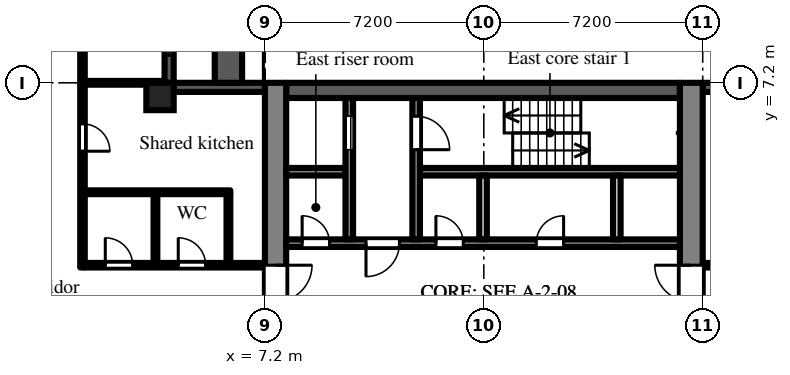
"""IFC4 building model, lengths in metres.
Left out: names, types, materials, properties, quantities, classifications, styles, units other than length and angle.
Written with IfcOpenShell. Run it as: python <this file> out.ifc"""

import sys

from ifc_helpers import new_model, si_unit, direction, frame, frame_2d, origin, origin_2d, place, context, subcontext, project, spatial, rectangle, extrude, element, fill, save


model = new_model("IFC4")
c1 = context("Model", 3, precision=1e-05, world=origin(), true_north=direction((0.0, 1.0)))
c2 = subcontext(c1, "Body", "Model", "MODEL_VIEW")
j1 = project(units=[si_unit("LENGTHUNIT", "METRE"), si_unit("PLANEANGLEUNIT", "RADIAN")], contexts=[c1])
p1 = place(None, origin())
s1 = spatial("IfcSite", under=j1, at=p1, CompositionType="ELEMENT")
p2 = place(p1, origin())
s2 = spatial("IfcBuilding", under=s1, at=p2, CompositionType="ELEMENT")
p3 = place(p2, frame((0.0, 0.0, 44.7)))
s3 = spatial("IfcBuildingStorey", under=s2, at=p3, CompositionType="ELEMENT", Elevation=44.7)
p4 = place(p3, frame((3.75, 6.75, 0.0), z_axis=(0.0, 0.0, 1.0), x_axis=(1.0, 0.0, 0.0)))
e1 = element("IfcColumn", 1, at=p4, inside=s3, PredefinedType="COLUMN", context=c2, shape_type="SweptSolid", body=[
    extrude(rectangle(XDim=0.9, YDim=0.9, at=origin_2d()), origin(), (0.0, 0.0, 1.0), 3.0),
])
p5 = place(p3, frame((24.3, 7.05, 0.0), z_axis=(0.0, 0.0, 1.0), x_axis=(-1.0, 0.0, 0.0)))
e2 = element("IfcWall", 2, at=p5, inside=s3, PredefinedType="SOLIDWALL", context=c2, shape_type="SweptSolid", body=[
    extrude(rectangle(XDim=2.7, YDim=0.3, at=frame_2d((1.35, 0.0))), origin(), (0.0, 0.0, 1.0), 2.1),
])
p6 = place(p5, frame((0.75, 0.0, 0.2)))
e3 = element("IfcOpeningElement", 3, at=p6, cuts=e2, PredefinedType="OPENING", context=c2, shape_type="SweptSolid", body=[
    extrude(rectangle(XDim=1.2, YDim=1.85, at=frame_2d((0.6, 0.925))), frame((0.0, 0.16, 0.0), z_axis=(0.0, -1.0, 0.0), x_axis=(1.0, 0.0, 0.0)), (0.0, 0.0, 1.0), 0.32),
])
p7 = place(p3, frame((7.2, 7.05, 0.0), z_axis=(0.0, 0.0, 1.0), x_axis=(-1.0, 0.0, 0.0)))
e4 = element("IfcWall", 4, at=p7, inside=s3, PredefinedType="SOLIDWALL", context=c2, shape_type="SweptSolid", body=[
    extrude(rectangle(XDim=3.0, YDim=0.3, at=frame_2d((1.5, 0.0))), origin(), (0.0, 0.0, 1.0), 2.1),
])
p8 = place(p3, frame((4.05, 7.2, 0.0), z_axis=(0.0, 0.0, 1.0), x_axis=(0.0, 1.0, 0.0)))
e5 = element("IfcWall", 5, at=p8, inside=s3, PredefinedType="SOLIDWALL", context=c2, shape_type="SweptSolid", body=[
    extrude(rectangle(XDim=7.2, YDim=0.3, at=frame_2d((3.6, 0.0))), origin(), (0.0, 0.0, 1.0), 2.1),
])
p9 = place(p8, frame((3.0, 0.0, 0.0)))
e6 = element("IfcOpeningElement", 6, at=p9, cuts=e5, PredefinedType="OPENING", context=c2, shape_type="SweptSolid", body=[
    extrude(rectangle(XDim=1.2, YDim=2.05, at=frame_2d((0.6, 1.025))), frame((0.0, 0.16, 0.0), z_axis=(0.0, -1.0, 0.0), x_axis=(1.0, 0.0, 0.0)), (0.0, 0.0, 1.0), 0.32),
])
p10 = place(p8, frame((0.9, 0.0, 0.2)))
e7 = element("IfcOpeningElement", 7, at=p10, cuts=e5, PredefinedType="OPENING", context=c2, shape_type="SweptSolid", body=[
    extrude(rectangle(XDim=1.8, YDim=1.85, at=frame_2d((0.9, 0.925))), frame((0.0, 0.16, 0.0), z_axis=(0.0, -1.0, 0.0), x_axis=(1.0, 0.0, 0.0)), (0.0, 0.0, 1.0), 0.32),
])
p11 = place(p8, frame((4.5, 0.0, 0.2)))
e8 = element("IfcOpeningElement", 8, at=p11, cuts=e5, PredefinedType="OPENING", context=c2, shape_type="SweptSolid", body=[
    extrude(rectangle(XDim=1.8, YDim=1.85, at=frame_2d((0.9, 0.925))), frame((0.0, 0.16, 0.0), z_axis=(0.0, -1.0, 0.0), x_axis=(1.0, 0.0, 0.0)), (0.0, 0.0, 1.0), 0.32),
])
p12 = place(p3, frame((6.0, 7.2, 0.0), z_axis=(0.0, 0.0, 1.0), x_axis=(0.0, 1.0, 0.0)))
e9 = element("IfcWall", 9, at=p12, inside=s3, PredefinedType="PARAPET", context=c2, shape_type="SweptSolid", body=[
    extrude(rectangle(XDim=7.2, YDim=0.9, at=frame_2d((3.6, 0.0))), origin(), (0.0, 0.0, 1.0), 0.8),
])
p13 = place(p3, frame((7.55, -7.2, 0.0), z_axis=(0.0, 0.0, 1.0), x_axis=(0.0, 1.0, 0.0)))
e10 = element("IfcWall", 10, at=p13, inside=s3, PredefinedType="SHEAR", context=c2, shape_type="SweptSolid", body=[
    extrude(rectangle(XDim=14.4, YDim=0.7, at=frame_2d((7.2, 0.0))), origin(), (0.0, 0.0, 1.0), 2.575),
])
p14 = place(p13, frame((6.0, 0.0, 0.0)))
e11 = element("IfcOpeningElement", 11, at=p14, cuts=e10, PredefinedType="OPENING", context=c2, shape_type="SweptSolid", body=[
    extrude(rectangle(XDim=2.4, YDim=2.2, at=frame_2d((1.2, 1.1))), frame((0.0, 0.36, 0.0), z_axis=(0.0, -1.0, 0.0), x_axis=(1.0, 0.0, 0.0)), (0.0, 0.0, 1.0), 0.72),
])
p15 = place(p3, frame((21.225, -7.2, 0.0), z_axis=(0.0, 0.0, 1.0), x_axis=(0.0, 1.0, 0.0)))
e12 = element("IfcWall", 12, at=p15, inside=s3, PredefinedType="SHEAR", context=c2, shape_type="SweptSolid", body=[
    extrude(rectangle(XDim=14.4, YDim=0.75, at=frame_2d((7.2, 0.0))), origin(), (0.0, 0.0, 1.0), 2.575),
])
p16 = place(p15, frame((6.0, 0.0, 0.0)))
e13 = element("IfcOpeningElement", 13, at=p16, cuts=e12, PredefinedType="OPENING", context=c2, shape_type="SweptSolid", body=[
    extrude(rectangle(XDim=2.4, YDim=2.2, at=frame_2d((1.2, 1.1))), frame((0.0, 0.385, 0.0), z_axis=(0.0, -1.0, 0.0), x_axis=(1.0, 0.0, 0.0)), (0.0, 0.0, 1.0), 0.77),
])
p17 = place(p3, frame((7.9, 6.95, 0.0), z_axis=(0.0, 0.0, 1.0), x_axis=(1.0, 0.0, 0.0)))
e14 = element("IfcWall", 14, at=p17, inside=s3, PredefinedType="SHEAR", context=c2, shape_type="SweptSolid", body=[
    extrude(rectangle(XDim=12.95, YDim=0.5, at=frame_2d((6.475, 0.0))), origin(), (0.0, 0.0, 1.0), 2.575),
])
p18 = place(p3, frame((7.9, 1.925, 0.0), z_axis=(0.0, 0.0, 1.0), x_axis=(1.0, 0.0, 0.0)))
e15 = element("IfcWall", 15, at=p18, inside=s3, PredefinedType="SHEAR", context=c2, shape_type="SweptSolid", body=[
    extrude(rectangle(XDim=12.95, YDim=0.25, at=frame_2d((6.475, 0.0))), origin(), (0.0, 0.0, 1.0), 2.575),
])
p19 = place(p18, frame((0.525, 0.0, 0.0)))
e16 = element("IfcOpeningElement", 16, at=p19, cuts=e15, PredefinedType="OPENING", context=c2, shape_type="SweptSolid", body=[
    extrude(rectangle(XDim=0.9, YDim=2.1, at=frame_2d((0.45, 1.05))), frame((0.0, 0.135, 0.0), z_axis=(0.0, -1.0, 0.0), x_axis=(1.0, 0.0, 0.0)), (0.0, 0.0, 1.0), 0.27),
])
p20 = place(p18, frame((2.625, 0.0, 0.0)))
e17 = element("IfcOpeningElement", 17, at=p20, cuts=e15, PredefinedType="OPENING", context=c2, shape_type="SweptSolid", body=[
    extrude(rectangle(XDim=1.1, YDim=2.1, at=frame_2d((0.55, 1.05))), frame((0.0, 0.135, 0.0), z_axis=(0.0, -1.0, 0.0), x_axis=(1.0, 0.0, 0.0)), (0.0, 0.0, 1.0), 0.27),
])
p21 = place(p18, frame((4.925, 0.0, 0.0)))
e18 = element("IfcOpeningElement", 18, at=p21, cuts=e15, PredefinedType="OPENING", context=c2, shape_type="SweptSolid", body=[
    extrude(rectangle(XDim=0.9, YDim=2.1, at=frame_2d((0.45, 1.05))), frame((0.0, 0.135, 0.0), z_axis=(0.0, -1.0, 0.0), x_axis=(1.0, 0.0, 0.0)), (0.0, 0.0, 1.0), 0.27),
])
p22 = place(p18, frame((8.225, 0.0, 0.0)))
e19 = element("IfcOpeningElement", 19, at=p22, cuts=e15, PredefinedType="OPENING", context=c2, shape_type="SweptSolid", body=[
    extrude(rectangle(XDim=0.9, YDim=2.1, at=frame_2d((0.45, 1.05))), frame((0.0, 0.135, 0.0), z_axis=(0.0, -1.0, 0.0), x_axis=(1.0, 0.0, 0.0)), (0.0, 0.0, 1.0), 0.27),
])
p23 = place(p3, frame((7.9, 4.275, 0.0), z_axis=(0.0, 0.0, 1.0), x_axis=(1.0, 0.0, 0.0)))
e20 = element("IfcWall", 20, at=p23, inside=s3, PredefinedType="SHEAR", context=c2, shape_type="SweptSolid", body=[
    extrude(rectangle(XDim=1.95, YDim=0.25, at=frame_2d((0.975, 0.0))), origin(), (0.0, 0.0, 1.0), 2.575),
])
p24 = place(p3, frame((12.3, 4.275, 0.0), z_axis=(0.0, 0.0, 1.0), x_axis=(1.0, 0.0, 0.0)))
e21 = element("IfcWall", 21, at=p24, inside=s3, PredefinedType="SHEAR", context=c2, shape_type="SweptSolid", body=[
    extrude(rectangle(XDim=8.55, YDim=0.25, at=frame_2d((4.275, 0.0))), origin(), (0.0, 0.0, 1.0), 2.575),
])
p25 = place(p3, frame((9.975, 2.05, 0.0), z_axis=(0.0, 0.0, 1.0), x_axis=(0.0, 1.0, 0.0)))
e22 = element("IfcWall", 22, at=p25, inside=s3, PredefinedType="SHEAR", context=c2, shape_type="SweptSolid", body=[
    extrude(rectangle(XDim=4.65, YDim=0.25, at=frame_2d((2.325, 0.0))), origin(), (0.0, 0.0, 1.0), 2.575),
])
p26 = place(p25, frame((2.95, 0.0, 0.0)))
e23 = element("IfcOpeningElement", 23, at=p26, cuts=e22, PredefinedType="OPENING", context=c2, shape_type="SweptSolid", body=[
    extrude(rectangle(XDim=1.1, YDim=2.1, at=frame_2d((0.55, 1.05))), frame((0.0, 0.135, 0.0), z_axis=(0.0, -1.0, 0.0), x_axis=(1.0, 0.0, 0.0)), (0.0, 0.0, 1.0), 0.27),
])
p27 = place(p3, frame((12.175, 2.05, 0.0), z_axis=(0.0, 0.0, 1.0), x_axis=(0.0, 1.0, 0.0)))
e24 = element("IfcWall", 24, at=p27, inside=s3, PredefinedType="SHEAR", context=c2, shape_type="SweptSolid", body=[
    extrude(rectangle(XDim=4.65, YDim=0.25, at=frame_2d((2.325, 0.0))), origin(), (0.0, 0.0, 1.0), 2.575),
])
p28 = place(p27, frame((2.95, 0.0, 0.0)))
e25 = element("IfcOpeningElement", 25, at=p28, cuts=e24, PredefinedType="OPENING", context=c2, shape_type="SweptSolid", body=[
    extrude(rectangle(XDim=1.1, YDim=2.1, at=frame_2d((0.55, 1.05))), frame((0.0, 0.135, 0.0), z_axis=(0.0, -1.0, 0.0), x_axis=(1.0, 0.0, 0.0)), (0.0, 0.0, 1.0), 0.27),
])
for number, where, z_axis, x_axis in (
    (26, (14.375, 2.05, 0.0), (0.0, 0.0, 1.0), (0.0, 1.0, 0.0)),
    (27, (18.775, 2.05, 0.0), (0.0, 0.0, 1.0), (0.0, 1.0, 0.0)),
):
    element("IfcWall", number, at=place(p3, frame(where, z_axis=z_axis, x_axis=x_axis)), inside=s3, PredefinedType="PARTITIONING", context=c2, shape_type="SweptSolid", body=[
        extrude(rectangle(XDim=2.1, YDim=0.25, at=frame_2d((1.05, 0.0))), origin(), (0.0, 0.0, 1.0), 2.575),
    ])
p29 = place(p3, frame((1.2, 1.125, 0.0), z_axis=(0.0, 0.0, 1.0), x_axis=(0.0, 1.0, 0.0)))
e28 = element("IfcWall", 28, at=p29, inside=s3, PredefinedType="PARTITIONING", context=c2, shape_type="SweptSolid", body=[
    extrude(rectangle(XDim=35.375, YDim=0.15, at=frame_2d((17.688, 0.0))), origin(), (0.0, 0.0, 1.0), 2.575),
])
p30 = place(p29, frame((3.825, 0.0, 0.0)))
e29 = element("IfcOpeningElement", 29, at=p30, cuts=e28, PredefinedType="OPENING", context=c2, shape_type="SweptSolid", body=[
    extrude(rectangle(XDim=0.9, YDim=2.1, at=frame_2d((0.45, 1.05))), frame((0.0, 0.085, 0.0), z_axis=(0.0, -1.0, 0.0), x_axis=(1.0, 0.0, 0.0)), (0.0, 0.0, 1.0), 0.17),
])
p31 = place(p29, frame((7.425, 0.0, 0.0)))
e30 = element("IfcOpeningElement", 30, at=p31, cuts=e28, PredefinedType="OPENING", context=c2, shape_type="SweptSolid", body=[
    extrude(rectangle(XDim=0.9, YDim=2.1, at=frame_2d((0.45, 1.05))), frame((0.0, 0.085, 0.0), z_axis=(0.0, -1.0, 0.0), x_axis=(1.0, 0.0, 0.0)), (0.0, 0.0, 1.0), 0.17),
])
p32 = place(p29, frame((13.725, 0.0, 0.0)))
e31 = element("IfcOpeningElement", 31, at=p32, cuts=e28, PredefinedType="OPENING", context=c2, shape_type="SweptSolid", body=[
    extrude(rectangle(XDim=0.9, YDim=2.1, at=frame_2d((0.45, 1.05))), frame((0.0, 0.085, 0.0), z_axis=(0.0, -1.0, 0.0), x_axis=(1.0, 0.0, 0.0)), (0.0, 0.0, 1.0), 0.17),
])
p33 = place(p29, frame((15.525, 0.0, 0.0)))
e32 = element("IfcOpeningElement", 32, at=p33, cuts=e28, PredefinedType="OPENING", context=c2, shape_type="SweptSolid", body=[
    extrude(rectangle(XDim=0.9, YDim=2.1, at=frame_2d((0.45, 1.05))), frame((0.0, 0.085, 0.0), z_axis=(0.0, -1.0, 0.0), x_axis=(1.0, 0.0, 0.0)), (0.0, 0.0, 1.0), 0.17),
])
p34 = place(p29, frame((32.825, 0.0, 0.0)))
e33 = element("IfcOpeningElement", 33, at=p34, cuts=e28, PredefinedType="OPENING", context=c2, shape_type="SweptSolid", body=[
    extrude(rectangle(XDim=1.0, YDim=2.1, at=frame_2d((0.5, 1.05))), frame((0.0, 0.085, 0.0), z_axis=(0.0, -1.0, 0.0), x_axis=(1.0, 0.0, 0.0)), (0.0, 0.0, 1.0), 0.17),
])
p35 = place(p3, frame((1.275, 1.2, 0.0), z_axis=(0.0, 0.0, 1.0), x_axis=(1.0, 0.0, 0.0)))
e34 = element("IfcWall", 34, at=p35, inside=s3, PredefinedType="PARTITIONING", context=c2, shape_type="SweptSolid", body=[
    extrude(rectangle(XDim=5.925, YDim=0.15, at=frame_2d((2.962, 0.0))), origin(), (0.0, 0.0, 1.0), 2.575),
])
p36 = place(p35, frame((0.675, 0.0, 0.0)))
e35 = element("IfcOpeningElement", 35, at=p36, cuts=e34, PredefinedType="OPENING", context=c2, shape_type="SweptSolid", body=[
    extrude(rectangle(XDim=0.9, YDim=2.1, at=frame_2d((0.45, 1.05))), frame((0.0, 0.085, 0.0), z_axis=(0.0, -1.0, 0.0), x_axis=(1.0, 0.0, 0.0)), (0.0, 0.0, 1.0), 0.17),
])
p37 = place(p35, frame((3.075, 0.0, 0.0)))
e36 = element("IfcOpeningElement", 36, at=p37, cuts=e34, PredefinedType="OPENING", context=c2, shape_type="SweptSolid", body=[
    extrude(rectangle(XDim=0.9, YDim=2.1, at=frame_2d((0.45, 1.05))), frame((0.0, 0.085, 0.0), z_axis=(0.0, -1.0, 0.0), x_axis=(1.0, 0.0, 0.0)), (0.0, 0.0, 1.0), 0.17),
])
p38 = place(p3, frame((1.275, 3.6, 0.0), z_axis=(0.0, 0.0, 1.0), x_axis=(1.0, 0.0, 0.0)))
e37 = element("IfcWall", 37, at=p38, inside=s3, PredefinedType="PARTITIONING", context=c2, shape_type="SweptSolid", body=[
    extrude(rectangle(XDim=4.788, YDim=0.125, at=frame_2d((2.394, 0.0))), origin(), (0.0, 0.0, 1.0), 2.575),
])
p39 = place(p3, frame((1.275, 7.2, 0.0), z_axis=(0.0, 0.0, 1.0), x_axis=(1.0, 0.0, 0.0)))
e38 = element("IfcWall", 38, at=p39, inside=s3, PredefinedType="PARTITIONING", context=c2, shape_type="SweptSolid", body=[
    extrude(rectangle(XDim=2.625, YDim=0.125, at=frame_2d((1.312, 0.0))), origin(), (0.0, 0.0, 1.0), 2.575),
])
for number, where, z_axis, x_axis in (
    (39, (3.6, 1.275, 0.0), (0.0, 0.0, 1.0), (0.0, 1.0, 0.0)),
    (40, (6.0, 1.275, 0.0), (0.0, 0.0, 1.0), (0.0, 1.0, 0.0)),
):
    element("IfcWall", number, at=place(p3, frame(where, z_axis=z_axis, x_axis=x_axis)), inside=s3, PredefinedType="PARTITIONING", context=c2, shape_type="SweptSolid", body=[
        extrude(rectangle(XDim=2.263, YDim=0.125, at=frame_2d((1.131, 0.0))), origin(), (0.0, 0.0, 1.0), 2.575),
    ])
p40 = place(p3, frame((21.6, 1.2, 0.0), z_axis=(0.0, 0.0, 1.0), x_axis=(1.0, 0.0, 0.0)))
e41 = element("IfcWall", 41, at=p40, inside=s3, PredefinedType="PARTITIONING", context=c2, shape_type="SweptSolid", body=[
    extrude(rectangle(XDim=14.9, YDim=0.15, at=frame_2d((7.45, 0.0))), origin(), (0.0, 0.0, 1.0), 2.575),
])
p41 = place(p40, frame((1.35, 0.0, 0.0)))
e42 = element("IfcOpeningElement", 42, at=p41, cuts=e41, PredefinedType="OPENING", context=c2, shape_type="SweptSolid", body=[
    extrude(rectangle(XDim=0.9, YDim=2.1, at=frame_2d((0.45, 1.05))), frame((0.0, 0.085, 0.0), z_axis=(0.0, -1.0, 0.0), x_axis=(1.0, 0.0, 0.0)), (0.0, 0.0, 1.0), 0.17),
])
p42 = place(p40, frame((9.49, 0.0, 0.0)))
e43 = element("IfcOpeningElement", 43, at=p42, cuts=e41, PredefinedType="OPENING", context=c2, shape_type="SweptSolid", body=[
    extrude(rectangle(XDim=1.0, YDim=2.1, at=frame_2d((0.5, 1.05))), frame((0.0, 0.085, 0.0), z_axis=(0.0, -1.0, 0.0), x_axis=(1.0, 0.0, 0.0)), (0.0, 0.0, 1.0), 0.17),
])
p43 = place(p40, frame((11.95, 0.0, 0.0)))
e44 = element("IfcOpeningElement", 44, at=p43, cuts=e41, PredefinedType="OPENING", context=c2, shape_type="SweptSolid", body=[
    extrude(rectangle(XDim=1.8, YDim=2.1, at=frame_2d((0.9, 1.05))), frame((0.0, 0.085, 0.0), z_axis=(0.0, -1.0, 0.0), x_axis=(1.0, 0.0, 0.0)), (0.0, 0.0, 1.0), 0.17),
])
p44 = place(p10, origin())
e45 = element("IfcWindow", 45, at=p44, inside=s3, PartitioningType="SINGLE_PANEL", PredefinedType="WINDOW", context=c2, shape_type="SweptSolid", body=[
    extrude(rectangle(XDim=1.8, YDim=1.85, at=frame_2d((0.9, 0.925))), frame((0.0, 0.03, 0.0), z_axis=(0.0, -1.0, 0.0), x_axis=(1.0, 0.0, 0.0)), (0.0, 0.0, 1.0), 0.06),
])
fill(e7, e45)
p45 = place(p26, origin())
e46 = element("IfcDoor", 46, at=p45, inside=s3, OperationType="SLIDING_TO_LEFT", PredefinedType="DOOR", context=c2, shape_type="SweptSolid", body=[
    extrude(rectangle(XDim=1.1, YDim=2.1, at=frame_2d((0.55, 1.05))), frame((0.0, 0.025, 0.0), z_axis=(0.0, -1.0, 0.0), x_axis=(1.0, 0.0, 0.0)), (0.0, 0.0, 1.0), 0.05),
])
fill(e23, e46)
p46 = place(p28, frame((1.1, 0.0, 0.0), z_axis=(0.0, 0.0, 1.0), x_axis=(-1.0, 0.0, 0.0)))
e47 = element("IfcDoor", 47, at=p46, inside=s3, OperationType="SINGLE_SWING_RIGHT", PredefinedType="DOOR", context=c2, shape_type="SweptSolid", body=[
    extrude(rectangle(XDim=1.1, YDim=2.1, at=frame_2d((0.55, 1.05))), frame((0.0, 0.025, 0.0), z_axis=(0.0, -1.0, 0.0), x_axis=(1.0, 0.0, 0.0)), (0.0, 0.0, 1.0), 0.05),
])
fill(e25, e47)
p47 = place(p19, origin())
e48 = element("IfcDoor", 48, at=p47, inside=s3, OperationType="SINGLE_SWING_LEFT", PredefinedType="DOOR", context=c2, shape_type="SweptSolid", body=[
    extrude(rectangle(XDim=0.9, YDim=2.1, at=frame_2d((0.45, 1.05))), frame((0.0, 0.025, 0.0), z_axis=(0.0, -1.0, 0.0), x_axis=(1.0, 0.0, 0.0)), (0.0, 0.0, 1.0), 0.05),
])
fill(e16, e48)
p48 = place(p20, frame((1.1, 0.0, 0.0), z_axis=(0.0, 0.0, 1.0), x_axis=(-1.0, 0.0, 0.0)))
e49 = element("IfcDoor", 49, at=p48, inside=s3, OperationType="SINGLE_SWING_RIGHT", PredefinedType="DOOR", context=c2, shape_type="SweptSolid", body=[
    extrude(rectangle(XDim=1.1, YDim=2.1, at=frame_2d((0.55, 1.05))), frame((0.0, 0.025, 0.0), z_axis=(0.0, -1.0, 0.0), x_axis=(1.0, 0.0, 0.0)), (0.0, 0.0, 1.0), 0.05),
])
fill(e17, e49)
p49 = place(p14, frame((2.4, 0.0, 0.0), z_axis=(0.0, 0.0, 1.0), x_axis=(-1.0, 0.0, 0.0)))
e50 = element("IfcDoor", 50, at=p49, inside=s3, OperationType="DOUBLE_DOOR_DOUBLE_SWING", PredefinedType="DOOR", context=c2, shape_type="SweptSolid", body=[
    extrude(rectangle(XDim=2.4, YDim=2.2, at=frame_2d((1.2, 1.1))), frame((0.0, 0.025, 0.0), z_axis=(0.0, -1.0, 0.0), x_axis=(1.0, 0.0, 0.0)), (0.0, 0.0, 1.0), 0.05),
])
fill(e11, e50)
p50 = place(p16, origin())
e51 = element("IfcDoor", 51, at=p50, inside=s3, OperationType="DOUBLE_DOOR_DOUBLE_SWING", PredefinedType="DOOR", context=c2, shape_type="SweptSolid", body=[
    extrude(rectangle(XDim=2.4, YDim=2.2, at=frame_2d((1.2, 1.1))), frame((0.0, 0.025, 0.0), z_axis=(0.0, -1.0, 0.0), x_axis=(1.0, 0.0, 0.0)), (0.0, 0.0, 1.0), 0.05),
])
fill(e13, e51)
p51 = place(p21, origin())
e52 = element("IfcDoor", 52, at=p51, inside=s3, OperationType="SINGLE_SWING_LEFT", PredefinedType="DOOR", context=c2, shape_type="SweptSolid", body=[
    extrude(rectangle(XDim=0.9, YDim=2.1, at=frame_2d((0.45, 1.05))), frame((0.0, 0.025, 0.0), z_axis=(0.0, -1.0, 0.0), x_axis=(1.0, 0.0, 0.0)), (0.0, 0.0, 1.0), 0.05),
])
fill(e18, e52)
p52 = place(p22, origin())
e53 = element("IfcDoor", 53, at=p52, inside=s3, OperationType="SINGLE_SWING_RIGHT", PredefinedType="DOOR", context=c2, shape_type="SweptSolid", body=[
    extrude(rectangle(XDim=0.9, YDim=2.1, at=frame_2d((0.45, 1.05))), frame((0.0, 0.025, 0.0), z_axis=(0.0, -1.0, 0.0), x_axis=(1.0, 0.0, 0.0)), (0.0, 0.0, 1.0), 0.05),
])
fill(e19, e53)
p53 = place(p36, origin())
e54 = element("IfcDoor", 54, at=p53, inside=s3, OperationType="SINGLE_SWING_LEFT", PredefinedType="DOOR", context=c2, shape_type="SweptSolid", body=[
    extrude(rectangle(XDim=0.9, YDim=2.1, at=frame_2d((0.45, 1.05))), frame((0.0, 0.025, 0.0), z_axis=(0.0, -1.0, 0.0), x_axis=(1.0, 0.0, 0.0)), (0.0, 0.0, 1.0), 0.05),
])
fill(e35, e54)
p54 = place(p37, origin())
e55 = element("IfcDoor", 55, at=p54, inside=s3, OperationType="SINGLE_SWING_LEFT", PredefinedType="DOOR", context=c2, shape_type="SweptSolid", body=[
    extrude(rectangle(XDim=0.9, YDim=2.1, at=frame_2d((0.45, 1.05))), frame((0.0, 0.025, 0.0), z_axis=(0.0, -1.0, 0.0), x_axis=(1.0, 0.0, 0.0)), (0.0, 0.0, 1.0), 0.05),
])
fill(e36, e55)
p55 = place(p30, frame((0.9, 0.0, 0.0), z_axis=(0.0, 0.0, 1.0), x_axis=(-1.0, 0.0, 0.0)))
e56 = element("IfcDoor", 56, at=p55, inside=s3, OperationType="SINGLE_SWING_RIGHT", PredefinedType="DOOR", context=c2, shape_type="SweptSolid", body=[
    extrude(rectangle(XDim=0.9, YDim=2.1, at=frame_2d((0.45, 1.05))), frame((0.0, 0.025, 0.0), z_axis=(0.0, -1.0, 0.0), x_axis=(1.0, 0.0, 0.0)), (0.0, 0.0, 1.0), 0.05),
])
fill(e29, e56)
save(model, sys.argv[1])
